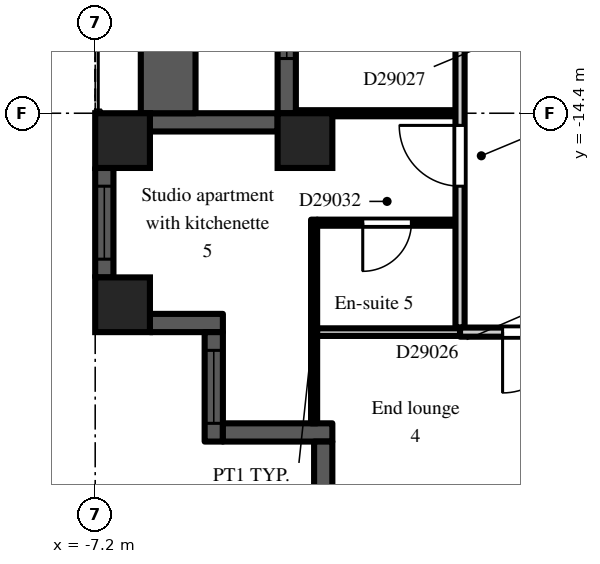
"""IFC4 building model, lengths in metres.
Left out: names, types, materials, properties, quantities, classifications, styles, units other than length and angle.
Written with IfcOpenShell. Run it as: python <this file> out.ifc"""

import sys

from ifc_helpers import new_model, si_unit, direction, frame, frame_2d, origin, origin_2d, place, context, subcontext, project, spatial, rectangle, extrude, element, fill, save


model = new_model("IFC4")
c1 = context("Model", 3, precision=1e-05, world=origin(), true_north=direction((0.0, 1.0)))
c2 = subcontext(c1, "Body", "Model", "MODEL_VIEW")
j1 = project(units=[si_unit("LENGTHUNIT", "METRE"), si_unit("PLANEANGLEUNIT", "RADIAN")], contexts=[c1])
p1 = place(None, origin())
s1 = spatial("IfcSite", under=j1, at=p1, CompositionType="ELEMENT")
p2 = place(p1, origin())
s2 = spatial("IfcBuilding", under=s1, at=p2, CompositionType="ELEMENT")
p3 = place(p2, frame((0.0, 0.0, 201.9)))
s3 = spatial("IfcBuildingStorey", under=s2, at=p3, CompositionType="ELEMENT", Elevation=201.9)
for number, where, z_axis, x_axis in (
    (1, (-6.75, -17.55, 0.0), (0.0, 0.0, 1.0), (1.0, 0.0, 0.0)),
    (2, (-6.75, -14.85, 0.0), (0.0, 0.0, 1.0), (1.0, 0.0, 0.0)),
    (3, (-3.75, -14.85, 0.0), (0.0, 0.0, 1.0), (1.0, 0.0, 0.0)),
):
    element("IfcColumn", number, at=place(p3, frame(where, z_axis=z_axis, x_axis=x_axis)), inside=s3, PredefinedType="COLUMN", context=c2, shape_type="SweptSolid", body=[
        extrude(rectangle(XDim=0.9, YDim=0.9, at=origin_2d()), origin(), (0.0, 0.0, 1.0), 3.0),
    ])
p4 = place(p3, frame((-4.05, -7.2, 0.0), z_axis=(0.0, 0.0, 1.0), x_axis=(0.0, -1.0, 0.0)))
e4 = element("IfcWall", 4, at=p4, inside=s3, PredefinedType="SOLIDWALL", context=c2, shape_type="SweptSolid", body=[
    extrude(rectangle(XDim=7.2, YDim=0.3, at=frame_2d((3.6, 0.0))), origin(), (0.0, 0.0, 1.0), 2.3),
])
p5 = place(p4, frame((3.0, 0.0, 0.0)))
e5 = element("IfcOpeningElement", 5, at=p5, cuts=e4, PredefinedType="OPENING", context=c2, shape_type="SweptSolid", body=[
    extrude(rectangle(XDim=1.2, YDim=2.05, at=frame_2d((0.6, 1.025))), frame((0.0, 0.16, 0.0), z_axis=(0.0, -1.0, 0.0), x_axis=(1.0, 0.0, 0.0)), (0.0, 0.0, 1.0), 0.32),
])
p6 = place(p4, frame((0.9, 0.0, 0.2)))
e6 = element("IfcOpeningElement", 6, at=p6, cuts=e4, PredefinedType="OPENING", context=c2, shape_type="SweptSolid", body=[
    extrude(rectangle(XDim=1.8, YDim=1.85, at=frame_2d((0.9, 0.925))), frame((0.0, 0.16, 0.0), z_axis=(0.0, -1.0, 0.0), x_axis=(1.0, 0.0, 0.0)), (0.0, 0.0, 1.0), 0.32),
])
p7 = place(p4, frame((4.5, 0.0, 0.2)))
e7 = element("IfcOpeningElement", 7, at=p7, cuts=e4, PredefinedType="OPENING", context=c2, shape_type="SweptSolid", body=[
    extrude(rectangle(XDim=1.8, YDim=1.85, at=frame_2d((0.9, 0.925))), frame((0.0, 0.16, 0.0), z_axis=(0.0, -1.0, 0.0), x_axis=(1.0, 0.0, 0.0)), (0.0, 0.0, 1.0), 0.32),
])
p8 = place(p3, frame((-4.2, -14.55, 0.0), z_axis=(0.0, 0.0, 1.0), x_axis=(-1.0, 0.0, 0.0)))
e8 = element("IfcWall", 8, at=p8, inside=s3, PredefinedType="SOLIDWALL", context=c2, shape_type="SweptSolid", body=[
    extrude(rectangle(XDim=2.1, YDim=0.3, at=frame_2d((1.05, 0.0))), origin(), (0.0, 0.0, 1.0), 2.3),
])
p9 = place(p3, frame((-7.05, -15.3, 0.0), z_axis=(0.0, 0.0, 1.0), x_axis=(0.0, -1.0, 0.0)))
e9 = element("IfcWall", 9, at=p9, inside=s3, PredefinedType="SOLIDWALL", context=c2, shape_type="SweptSolid", body=[
    extrude(rectangle(XDim=1.8, YDim=0.3, at=frame_2d((0.9, 0.0))), origin(), (0.0, 0.0, 1.0), 2.3),
])
p10 = place(p9, frame((0.3, 0.0, 0.2)))
e10 = element("IfcOpeningElement", 10, at=p10, cuts=e9, PredefinedType="OPENING", context=c2, shape_type="SweptSolid", body=[
    extrude(rectangle(XDim=1.2, YDim=1.85, at=frame_2d((0.6, 0.925))), frame((0.0, 0.16, 0.0), z_axis=(0.0, -1.0, 0.0), x_axis=(1.0, 0.0, 0.0)), (0.0, 0.0, 1.0), 0.32),
])
p11 = place(p3, frame((-6.3, -17.85, 0.0), z_axis=(0.0, 0.0, 1.0), x_axis=(1.0, 0.0, 0.0)))
e11 = element("IfcWall", 11, at=p11, inside=s3, PredefinedType="SOLIDWALL", context=c2, shape_type="SweptSolid", body=[
    extrude(rectangle(XDim=1.2, YDim=0.3, at=frame_2d((0.6, 0.0))), origin(), (0.0, 0.0, 1.0), 2.6),
])
p12 = place(p3, frame((-5.25, -18.0, 0.0), z_axis=(0.0, 0.0, 1.0), x_axis=(0.0, -1.0, 0.0)))
e12 = element("IfcWall", 12, at=p12, inside=s3, PredefinedType="SOLIDWALL", context=c2, shape_type="SweptSolid", body=[
    extrude(rectangle(XDim=1.8, YDim=0.3, at=frame_2d((0.9, 0.0))), origin(), (0.0, 0.0, 1.0), 2.6),
])
p13 = place(p12, frame((0.3, 0.0, 0.2)))
e13 = element("IfcOpeningElement", 13, at=p13, cuts=e12, PredefinedType="OPENING", context=c2, shape_type="SweptSolid", body=[
    extrude(rectangle(XDim=1.2, YDim=1.85, at=frame_2d((0.6, 0.925))), frame((0.0, 0.16, 0.0), z_axis=(0.0, -1.0, 0.0), x_axis=(1.0, 0.0, 0.0)), (0.0, 0.0, 1.0), 0.32),
])
p14 = place(p3, frame((-5.1, -19.65, 0.0), z_axis=(0.0, 0.0, 1.0), x_axis=(1.0, 0.0, 0.0)))
e14 = element("IfcWall", 14, at=p14, inside=s3, PredefinedType="SOLIDWALL", context=c2, shape_type="SweptSolid", body=[
    extrude(rectangle(XDim=1.8, YDim=0.3, at=frame_2d((0.9, 0.0))), origin(), (0.0, 0.0, 1.0), 2.6),
])
p15 = place(p3, frame((-3.45, -19.8, 0.0), z_axis=(0.0, 0.0, 1.0), x_axis=(0.0, -1.0, 0.0)))
e15 = element("IfcWall", 15, at=p15, inside=s3, PredefinedType="SOLIDWALL", context=c2, shape_type="SweptSolid", body=[
    extrude(rectangle(XDim=0.9, YDim=0.3, at=frame_2d((0.45, 0.0))), origin(), (0.0, 0.0, 1.0), 2.6),
])
p16 = place(p3, frame((-6.0, -14.4, 0.0), z_axis=(0.0, 0.0, 1.0), x_axis=(0.0, 1.0, 0.0)))
e16 = element("IfcWall", 16, at=p16, inside=s3, PredefinedType="PARAPET", context=c2, shape_type="SweptSolid", body=[
    extrude(rectangle(XDim=7.2, YDim=0.9, at=frame_2d((3.6, 0.0))), origin(), (0.0, 0.0, 1.0), 0.8),
])
p17 = place(p3, frame((-3.9, -14.4, 0.0), z_axis=(0.0, 0.0, 1.0), x_axis=(1.0, 0.0, 0.0)))
e17 = element("IfcWall", 17, at=p17, inside=s3, PredefinedType="PARTITIONING", context=c2, shape_type="SweptSolid", body=[
    extrude(rectangle(XDim=2.625, YDim=0.1, at=frame_2d((1.312, 0.0))), origin(), (0.0, 0.0, 1.0), 2.6),
])
p18 = place(p3, frame((-3.6, -19.5, 0.0), z_axis=(0.0, 0.0, 1.0), x_axis=(0.0, 1.0, 0.0)))
e18 = element("IfcWall", 18, at=p18, inside=s3, PredefinedType="PARTITIONING", context=c2, shape_type="SweptSolid", body=[
    extrude(rectangle(XDim=3.35, YDim=0.1, at=frame_2d((1.675, 0.0))), origin(), (0.0, 0.0, 1.0), 2.6),
])
p19 = place(p3, frame((-3.55, -18.0, 0.0), z_axis=(0.0, 0.0, 1.0), x_axis=(1.0, 0.0, 0.0)))
e19 = element("IfcWall", 19, at=p19, inside=s3, PredefinedType="PARTITIONING", context=c2, shape_type="SweptSolid", body=[
    extrude(rectangle(XDim=2.35, YDim=0.125, at=frame_2d((1.175, 0.0))), origin(), (0.0, 0.0, 1.0), 2.6),
])
p20 = place(p3, frame((-3.55, -16.2, 0.0), z_axis=(0.0, 0.0, 1.0), x_axis=(1.0, 0.0, 0.0)))
e20 = element("IfcWall", 20, at=p20, inside=s3, PredefinedType="PARTITIONING", context=c2, shape_type="SweptSolid", body=[
    extrude(rectangle(XDim=2.275, YDim=0.1, at=frame_2d((1.138, 0.0))), origin(), (0.0, 0.0, 1.0), 2.6),
])
p21 = place(p20, frame((0.75, 0.0, 0.0)))
e21 = element("IfcOpeningElement", 21, at=p21, cuts=e20, PredefinedType="OPENING", context=c2, shape_type="SweptSolid", body=[
    extrude(rectangle(XDim=0.8, YDim=2.1, at=frame_2d((0.4, 1.05))), frame((0.0, 0.06, 0.0), z_axis=(0.0, -1.0, 0.0), x_axis=(1.0, 0.0, 0.0)), (0.0, 0.0, 1.0), 0.12),
])
p22 = place(p3, frame((-1.2, -17.925, 0.0), z_axis=(0.0, 0.0, 1.0), x_axis=(0.0, 1.0, 0.0)))
e22 = element("IfcWall", 22, at=p22, inside=s3, PredefinedType="PARTITIONING", context=c2, shape_type="SweptSolid", body=[
    extrude(rectangle(XDim=16.65, YDim=0.15, at=frame_2d((8.325, 0.0))), origin(), (0.0, 0.0, 1.0), 2.6),
])
p23 = place(p22, frame((12.175, 0.0, 0.0)))
e23 = element("IfcOpeningElement", 23, at=p23, cuts=e22, PredefinedType="OPENING", context=c2, shape_type="SweptSolid", body=[
    extrude(rectangle(XDim=0.9, YDim=2.1, at=frame_2d((0.45, 1.05))), frame((0.0, 0.085, 0.0), z_axis=(0.0, -1.0, 0.0), x_axis=(1.0, 0.0, 0.0)), (0.0, 0.0, 1.0), 0.17),
])
p24 = place(p22, frame((8.875, 0.0, 0.0)))
e24 = element("IfcOpeningElement", 24, at=p24, cuts=e22, PredefinedType="OPENING", context=c2, shape_type="SweptSolid", body=[
    extrude(rectangle(XDim=0.9, YDim=2.1, at=frame_2d((0.45, 1.05))), frame((0.0, 0.085, 0.0), z_axis=(0.0, -1.0, 0.0), x_axis=(1.0, 0.0, 0.0)), (0.0, 0.0, 1.0), 0.17),
])
p25 = place(p22, frame((5.275, 0.0, 0.0)))
e25 = element("IfcOpeningElement", 25, at=p25, cuts=e22, PredefinedType="OPENING", context=c2, shape_type="SweptSolid", body=[
    extrude(rectangle(XDim=0.9, YDim=2.1, at=frame_2d((0.45, 1.05))), frame((0.0, 0.085, 0.0), z_axis=(0.0, -1.0, 0.0), x_axis=(1.0, 0.0, 0.0)), (0.0, 0.0, 1.0), 0.17),
])
p26 = place(p22, frame((2.325, 0.0, 0.0)))
e26 = element("IfcOpeningElement", 26, at=p26, cuts=e22, PredefinedType="OPENING", context=c2, shape_type="SweptSolid", body=[
    extrude(rectangle(XDim=1.0, YDim=2.1, at=frame_2d((0.5, 1.05))), frame((0.0, 0.085, 0.0), z_axis=(0.0, -1.0, 0.0), x_axis=(1.0, 0.0, 0.0)), (0.0, 0.0, 1.0), 0.17),
])
p27 = place(p3, frame((-1.2, -18.0, 0.0), z_axis=(0.0, 0.0, 1.0), x_axis=(1.0, 0.0, 0.0)))
e27 = element("IfcWall", 27, at=p27, inside=s3, PredefinedType="PARTITIONING", context=c2, shape_type="SweptSolid", body=[
    extrude(rectangle(XDim=2.4, YDim=0.15, at=frame_2d((1.2, 0.0))), origin(), (0.0, 0.0, 1.0), 2.6),
])
p28 = place(p27, frame((0.7, 0.0, 0.0)))
e28 = element("IfcOpeningElement", 28, at=p28, cuts=e27, PredefinedType="OPENING", context=c2, shape_type="SweptSolid", body=[
    extrude(rectangle(XDim=1.0, YDim=2.1, at=frame_2d((0.5, 1.05))), frame((0.0, 0.085, 0.0), z_axis=(0.0, -1.0, 0.0), x_axis=(1.0, 0.0, 0.0)), (0.0, 0.0, 1.0), 0.17),
])
p29 = place(p7, origin())
e29 = element("IfcWindow", 29, at=p29, inside=s3, PartitioningType="SINGLE_PANEL", PredefinedType="WINDOW", context=c2, shape_type="SweptSolid", body=[
    extrude(rectangle(XDim=1.8, YDim=1.85, at=frame_2d((0.9, 0.925))), frame((0.0, 0.03, 0.0), z_axis=(0.0, -1.0, 0.0), x_axis=(1.0, 0.0, 0.0)), (0.0, 0.0, 1.0), 0.06),
])
fill(e7, e29)
p30 = place(p10, origin())
e30 = element("IfcWindow", 30, at=p30, inside=s3, PartitioningType="SINGLE_PANEL", PredefinedType="WINDOW", context=c2, shape_type="SweptSolid", body=[
    extrude(rectangle(XDim=1.2, YDim=1.85, at=frame_2d((0.6, 0.925))), frame((0.0, 0.03, 0.0), z_axis=(0.0, -1.0, 0.0), x_axis=(1.0, 0.0, 0.0)), (0.0, 0.0, 1.0), 0.06),
])
fill(e10, e30)
p31 = place(p13, origin())
e31 = element("IfcWindow", 31, at=p31, inside=s3, PartitioningType="SINGLE_PANEL", PredefinedType="WINDOW", context=c2, shape_type="SweptSolid", body=[
    extrude(rectangle(XDim=1.2, YDim=1.85, at=frame_2d((0.6, 0.925))), frame((0.0, 0.03, 0.0), z_axis=(0.0, -1.0, 0.0), x_axis=(1.0, 0.0, 0.0)), (0.0, 0.0, 1.0), 0.06),
])
fill(e13, e31)
p32 = place(p28, frame((1.0, 0.0, 0.0), z_axis=(0.0, 0.0, 1.0), x_axis=(-1.0, 0.0, 0.0)))
e32 = element("IfcDoor", 32, at=p32, inside=s3, OperationType="SINGLE_SWING_RIGHT", PredefinedType="DOOR", context=c2, shape_type="SweptSolid", body=[
    extrude(rectangle(XDim=1.0, YDim=2.1, at=frame_2d((0.5, 1.05))), frame((0.0, 0.025, 0.0), z_axis=(0.0, -1.0, 0.0), x_axis=(1.0, 0.0, 0.0)), (0.0, 0.0, 1.0), 0.05),
])
fill(e28, e32)
p33 = place(p21, frame((0.8, 0.0, 0.0), z_axis=(0.0, 0.0, 1.0), x_axis=(-1.0, 0.0, 0.0)))
e33 = element("IfcDoor", 33, at=p33, inside=s3, OperationType="SINGLE_SWING_RIGHT", PredefinedType="DOOR", context=c2, shape_type="SweptSolid", body=[
    extrude(rectangle(XDim=0.8, YDim=2.1, at=frame_2d((0.4, 1.05))), frame((0.0, 0.025, 0.0), z_axis=(0.0, -1.0, 0.0), x_axis=(1.0, 0.0, 0.0)), (0.0, 0.0, 1.0), 0.05),
])
fill(e21, e33)
p34 = place(p26, origin())
e34 = element("IfcDoor", 34, at=p34, inside=s3, OperationType="SINGLE_SWING_RIGHT", PredefinedType="DOOR", context=c2, shape_type="SweptSolid", body=[
    extrude(rectangle(XDim=1.0, YDim=2.1, at=frame_2d((0.5, 1.05))), frame((0.0, 0.025, 0.0), z_axis=(0.0, -1.0, 0.0), x_axis=(1.0, 0.0, 0.0)), (0.0, 0.0, 1.0), 0.05),
])
fill(e26, e34)
save(model, sys.argv[1])
